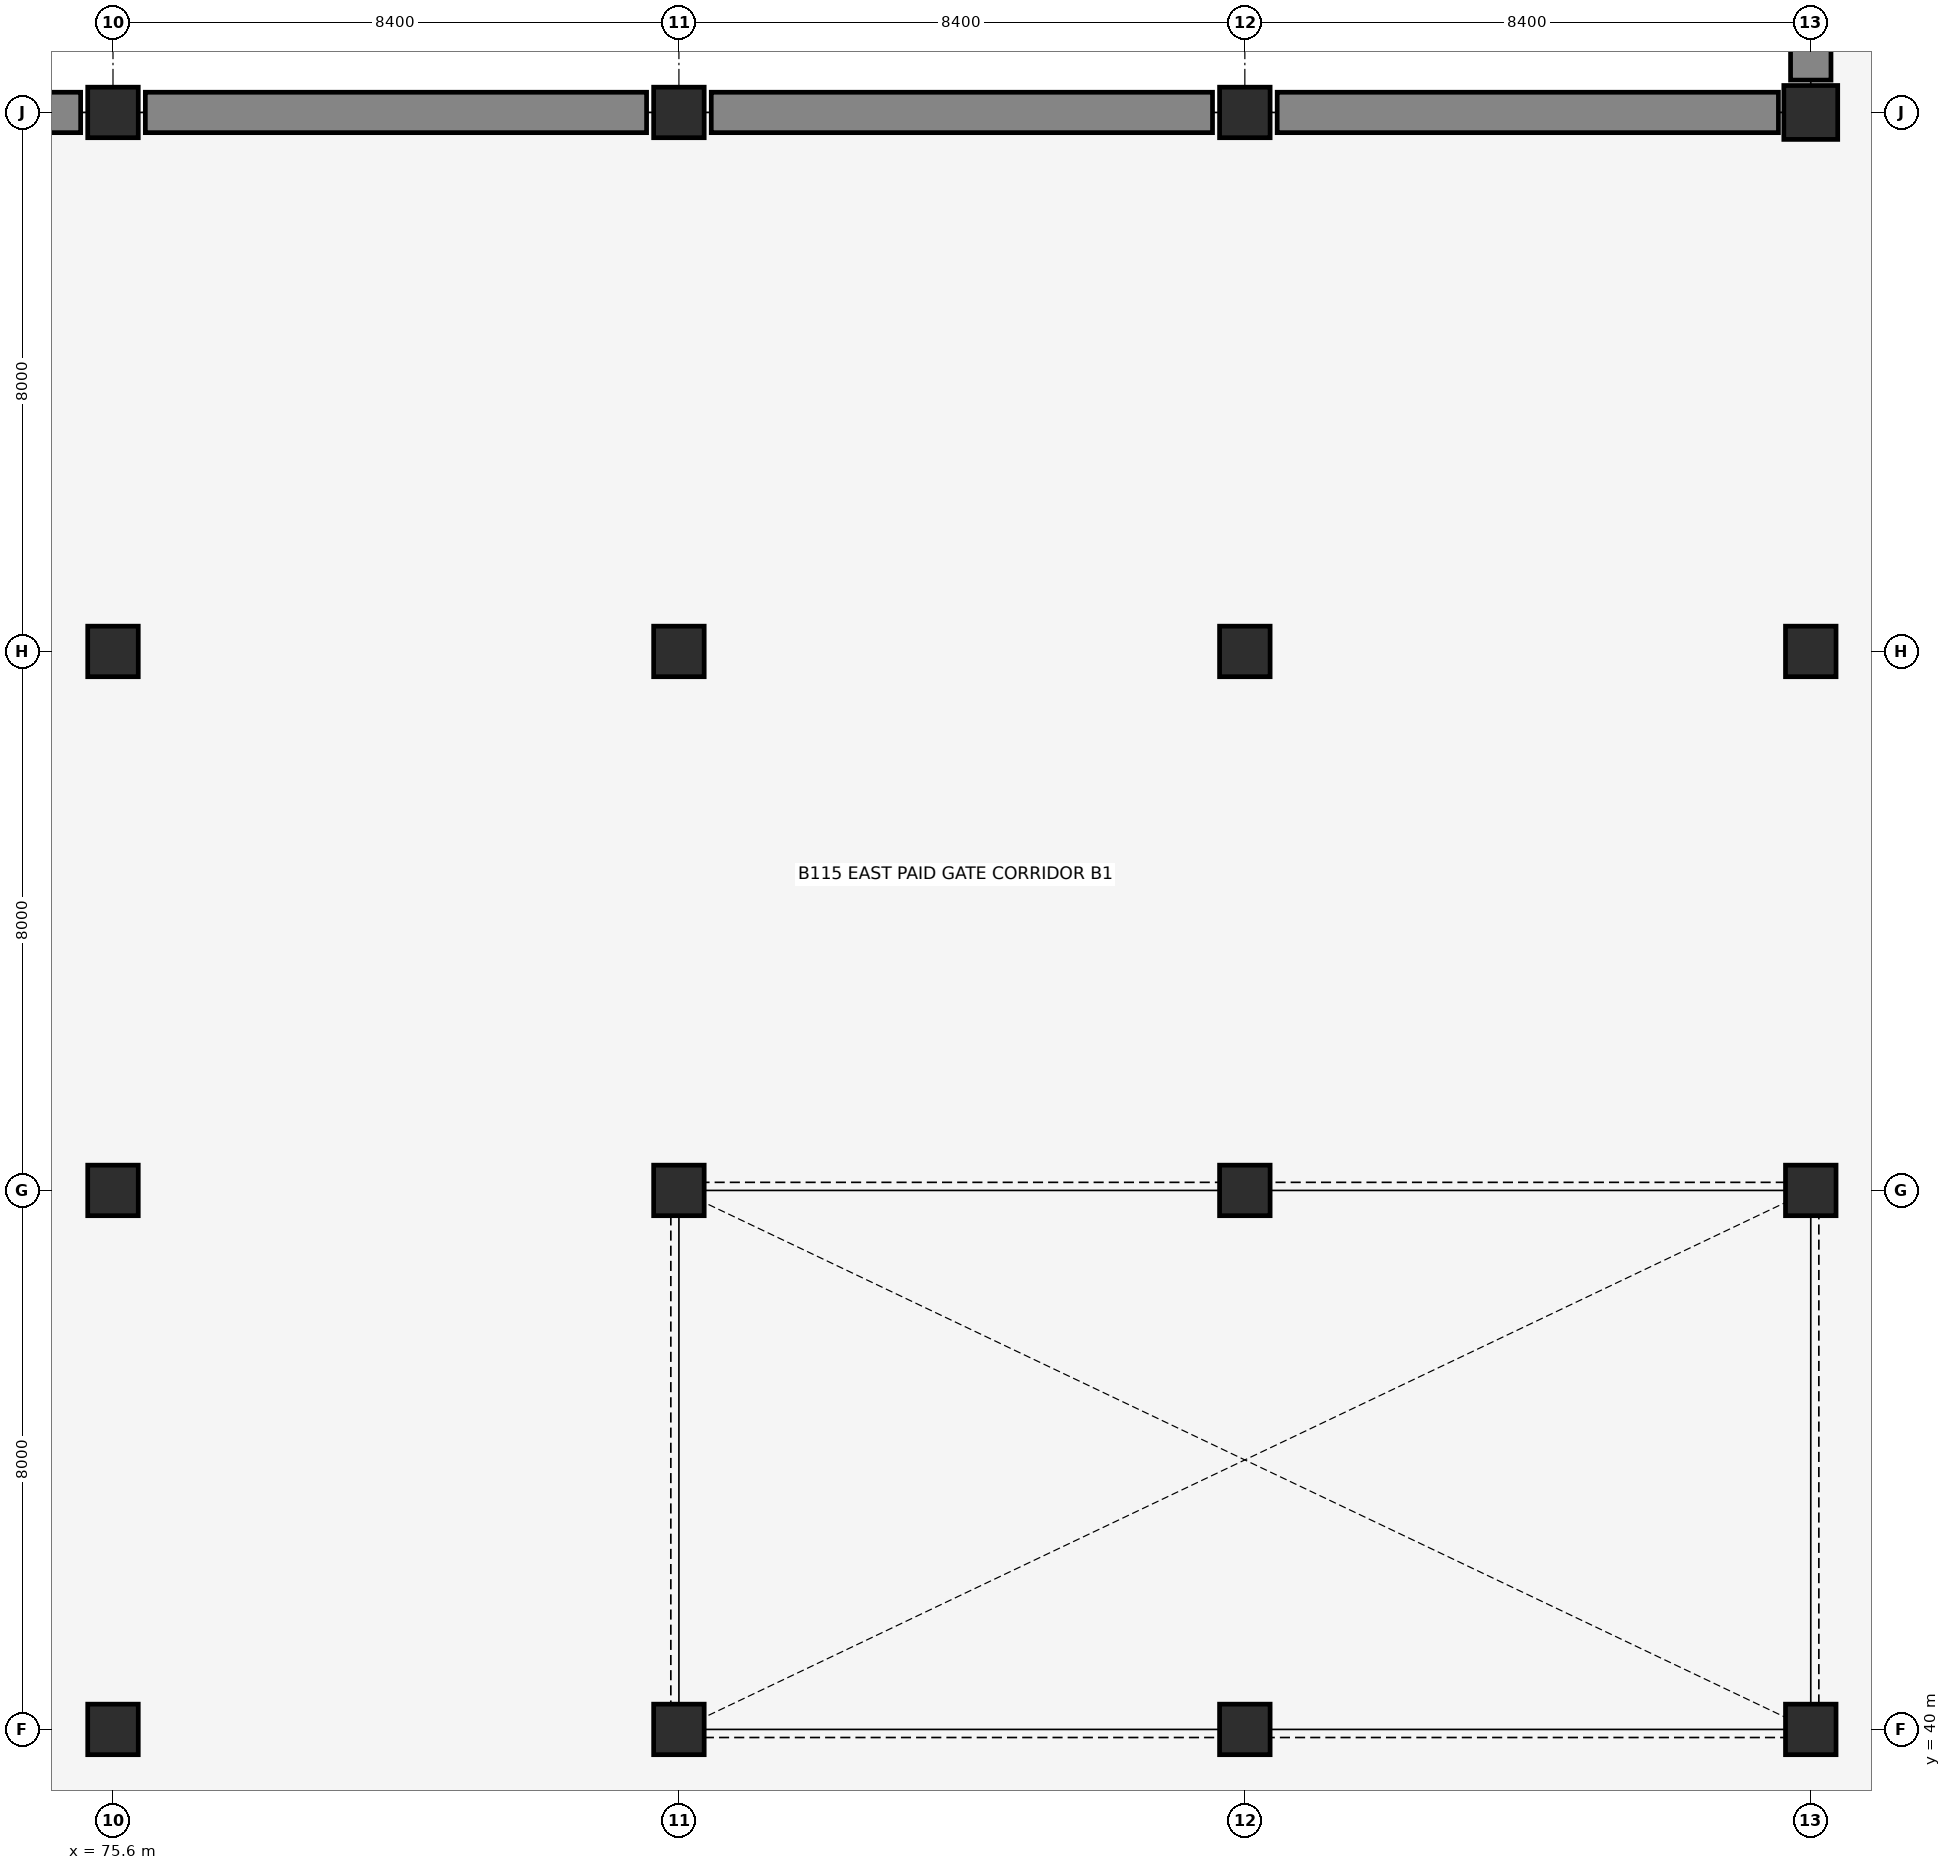
"""IFC4 building model, lengths in metres.
Left out: names, types, materials, properties, quantities, classifications, styles, units other than length and angle.
Written with IfcOpenShell. Run it as: python <this file> out.ifc"""

import sys

from ifc_helpers import new_model, si_unit, direction, frame, frame_2d, origin, origin_2d, place, context, subcontext, project, spatial, rectangle, extrude, element, save


model = new_model("IFC4")
c1 = context("Model", 3, precision=1e-05, world=origin(), true_north=direction((0.0, 1.0)))
c2 = subcontext(c1, "Body", "Model", "MODEL_VIEW")
j1 = project(units=[si_unit("LENGTHUNIT", "METRE"), si_unit("PLANEANGLEUNIT", "RADIAN")], contexts=[c1])
p1 = place(None, origin())
s1 = spatial("IfcSite", under=j1, at=p1, CompositionType="ELEMENT")
p2 = place(p1, origin())
s2 = spatial("IfcBuilding", under=s1, at=p2, CompositionType="ELEMENT")
p3 = place(p2, frame((0.0, 0.0, -5.44)))
s3 = spatial("IfcBuildingStorey", under=s2, at=p3, CompositionType="ELEMENT", Elevation=-5.44)
p4 = place(p3, frame((67.68, 64.0, 0.0), z_axis=(0.0, 0.0, 1.0), x_axis=(1.0, 0.0, 0.0)))
e1 = element("IfcWall", 1, at=p4, inside=s3, PredefinedType="SOLIDWALL", context=c2, shape_type="SweptSolid", body=[
    extrude(rectangle(XDim=7.44, YDim=0.6, at=frame_2d((3.72, 0.0))), origin(), (0.0, 0.0, 1.0), 5.02),
])
for number, where, z_axis, x_axis in (
    (2, (76.08, 64.0, 0.0), (0.0, 0.0, 1.0), (1.0, 0.0, 0.0)),
    (3, (84.48, 64.0, 0.0), (0.0, 0.0, 1.0), (1.0, 0.0, 0.0)),
):
    element("IfcWall", number, at=place(p3, frame(where, z_axis=z_axis, x_axis=x_axis)), inside=s3, PredefinedType="SOLIDWALL", context=c2, shape_type="SweptSolid", body=[
        extrude(rectangle(XDim=7.44, YDim=0.6, at=frame_2d((3.72, 0.0))), origin(), (0.0, 0.0, 1.0), 5.02),
    ])
p5 = place(p3, frame((92.88, 64.0, 0.0), z_axis=(0.0, 0.0, 1.0), x_axis=(1.0, 0.0, 0.0)))
e4 = element("IfcWall", 4, at=p5, inside=s3, PredefinedType="SOLIDWALL", context=c2, shape_type="SweptSolid", body=[
    extrude(rectangle(XDim=7.44, YDim=0.6, at=frame_2d((3.72, 0.0))), origin(), (0.0, 0.0, 1.0), 5.02),
])
p6 = place(p3, frame((100.8, 64.48, 0.0), z_axis=(0.0, 0.0, 1.0), x_axis=(0.0, 1.0, 0.0)))
e5 = element("IfcWall", 5, at=p6, inside=s3, PredefinedType="SOLIDWALL", context=c2, shape_type="SweptSolid", body=[
    extrude(rectangle(XDim=7.04, YDim=0.6, at=frame_2d((3.52, 0.0))), origin(), (0.0, 0.0, 1.0), 5.02),
])
for number, where, z_axis, x_axis in (
    (6, (75.6, 40.0, 0.0), (0.0, 0.0, 1.0), (1.0, 0.0, 0.0)),
    (7, (75.6, 48.0, 0.0), (0.0, 0.0, 1.0), (1.0, 0.0, 0.0)),
    (8, (75.6, 56.0, 0.0), (0.0, 0.0, 1.0), (1.0, 0.0, 0.0)),
    (9, (75.6, 64.0, 0.0), (0.0, 0.0, 1.0), (1.0, 0.0, 0.0)),
    (10, (84.0, 40.0, 0.0), (0.0, 0.0, 1.0), (1.0, 0.0, 0.0)),
    (11, (84.0, 48.0, 0.0), (0.0, 0.0, 1.0), (1.0, 0.0, 0.0)),
    (12, (84.0, 56.0, 0.0), (0.0, 0.0, 1.0), (1.0, 0.0, 0.0)),
    (13, (84.0, 64.0, 0.0), (0.0, 0.0, 1.0), (1.0, 0.0, 0.0)),
    (14, (92.4, 40.0, 0.0), (0.0, 0.0, 1.0), (1.0, 0.0, 0.0)),
    (15, (92.4, 48.0, 0.0), (0.0, 0.0, 1.0), (1.0, 0.0, 0.0)),
    (16, (92.4, 56.0, 0.0), (0.0, 0.0, 1.0), (1.0, 0.0, 0.0)),
    (17, (92.4, 64.0, 0.0), (0.0, 0.0, 1.0), (1.0, 0.0, 0.0)),
    (18, (100.8, 40.0, 0.0), (0.0, 0.0, 1.0), (1.0, 0.0, 0.0)),
    (19, (100.8, 48.0, 0.0), (0.0, 0.0, 1.0), (1.0, 0.0, 0.0)),
    (20, (100.8, 56.0, 0.0), (0.0, 0.0, 1.0), (1.0, 0.0, 0.0)),
):
    element("IfcColumn", number, at=place(p3, frame(where, z_axis=z_axis, x_axis=x_axis)), inside=s3, PredefinedType="COLUMN", context=c2, shape_type="SweptSolid", body=[
        extrude(rectangle(XDim=0.75, YDim=0.75, at=origin_2d()), origin(), (0.0, 0.0, 1.0), 5.02),
    ])
p7 = place(p3, frame((100.8, 64.0, 0.0), z_axis=(0.0, 0.0, 1.0), x_axis=(1.0, 0.0, 0.0)))
e21 = element("IfcColumn", 21, at=p7, inside=s3, PredefinedType="COLUMN", context=c2, shape_type="SweptSolid", body=[
    extrude(rectangle(XDim=0.8, YDim=0.8, at=origin_2d()), origin(), (0.0, 0.0, 1.0), 5.02),
])
save(model, sys.argv[1])
